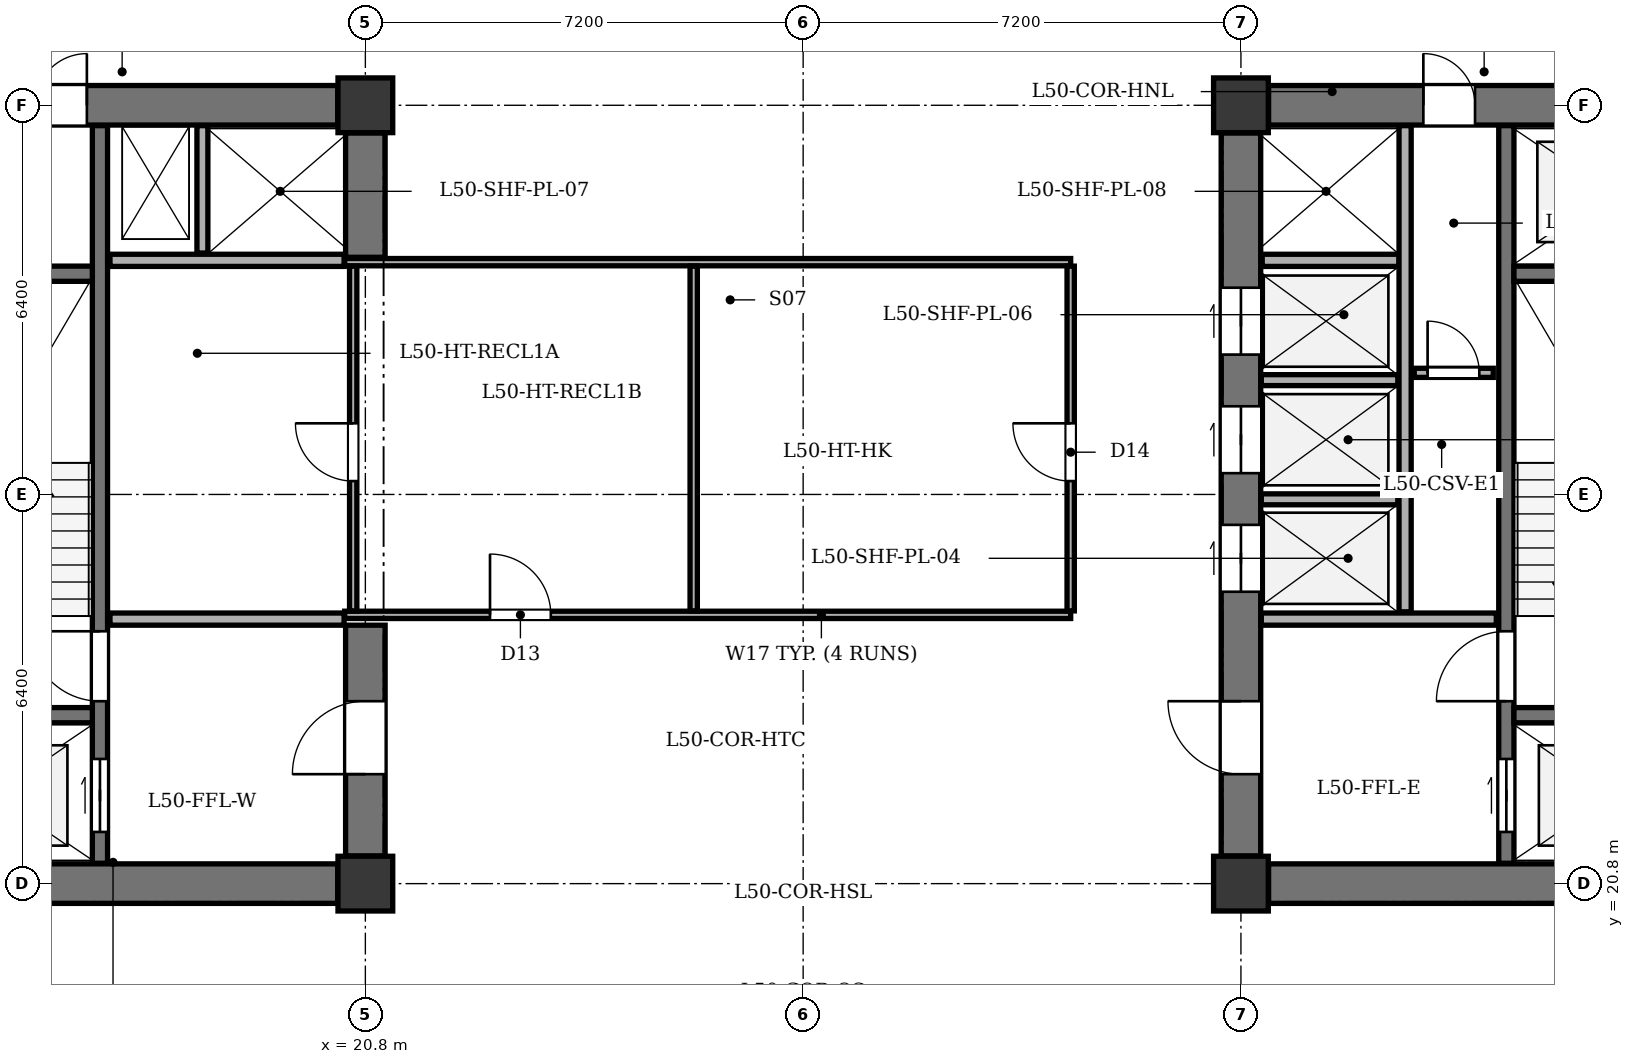
"""IFC4 building model, lengths in metres.
Left out: names, types, materials, properties, quantities, classifications, styles, units other than length and angle.
Written with IfcOpenShell. Run it as: python <this file> out.ifc"""

import sys

from ifc_helpers import new_model, si_unit, direction, frame, frame_2d, origin, origin_2d, place, context, subcontext, project, spatial, rectangle, extrude, element, fill, save


model = new_model("IFC4")
c1 = context("Model", 3, precision=1e-05, world=origin(), true_north=direction((0.0, 1.0)))
c2 = subcontext(c1, "Body", "Model", "MODEL_VIEW")
j1 = project(units=[si_unit("LENGTHUNIT", "METRE"), si_unit("PLANEANGLEUNIT", "RADIAN")], contexts=[c1])
p1 = place(None, origin())
s1 = spatial("IfcSite", under=j1, at=p1, CompositionType="ELEMENT")
p2 = place(p1, origin())
s2 = spatial("IfcBuilding", under=s1, at=p2, CompositionType="ELEMENT")
p3 = place(p2, frame((0.0, 0.0, 193.8)))
s3 = spatial("IfcBuildingStorey", under=s2, at=p3, CompositionType="ELEMENT", Elevation=193.8)
for number, where, z_axis, x_axis in (
    (1, (20.8, 20.8, 0.0), (0.0, 0.0, 1.0), (1.0, 0.0, 0.0)),
    (2, (20.8, 33.6, 0.0), (0.0, 0.0, 1.0), (1.0, 0.0, 0.0)),
    (3, (35.2, 20.8, 0.0), (0.0, 0.0, 1.0), (1.0, 0.0, 0.0)),
    (4, (35.2, 33.6, 0.0), (0.0, 0.0, 1.0), (1.0, 0.0, 0.0)),
):
    element("IfcColumn", number, at=place(p3, frame(where, z_axis=z_axis, x_axis=x_axis)), inside=s3, PredefinedType="COLUMN", context=c2, shape_type="SweptSolid", body=[
        extrude(rectangle(XDim=0.9, YDim=0.9, at=origin_2d()), origin(), (0.0, 0.0, 1.0), 3.5),
    ])
p4 = place(p3, frame((13.255, 20.8, 0.0), z_axis=(0.0, 0.0, 1.0), x_axis=(1.0, 0.0, 0.0)))
e5 = element("IfcWall", 5, at=p4, inside=s3, PredefinedType="SHEAR", context=c2, shape_type="SweptSolid", body=[
    extrude(rectangle(XDim=7.09, YDim=0.65, at=frame_2d((3.545, 0.0))), origin(), (0.0, 0.0, 1.0), 3.05),
])
p5 = place(p3, frame((13.255, 33.6, 0.0), z_axis=(0.0, 0.0, 1.0), x_axis=(1.0, 0.0, 0.0)))
e6 = element("IfcWall", 6, at=p5, inside=s3, PredefinedType="SHEAR", context=c2, shape_type="SweptSolid", body=[
    extrude(rectangle(XDim=7.09, YDim=0.65, at=frame_2d((3.545, 0.0))), origin(), (0.0, 0.0, 1.0), 3.05),
])
p6 = place(p5, frame((2.115, 0.0, 0.0)))
e7 = element("IfcOpeningElement", 7, at=p6, cuts=e6, PredefinedType="OPENING", context=c2, shape_type="SweptSolid", body=[
    extrude(rectangle(XDim=0.85, YDim=2.02, at=frame_2d((0.425, 1.01))), frame((0.0, 0.335, 0.0), z_axis=(0.0, -1.0, 0.0), x_axis=(1.0, 0.0, 0.0)), (0.0, 0.0, 1.0), 0.67),
])
p7 = place(p3, frame((20.8, 21.255, 0.0), z_axis=(0.0, 0.0, 1.0), x_axis=(0.0, 1.0, 0.0)))
e8 = element("IfcWall", 8, at=p7, inside=s3, PredefinedType="SHEAR", context=c2, shape_type="SweptSolid", body=[
    extrude(rectangle(XDim=3.795, YDim=0.65, at=frame_2d((1.897, 0.0))), origin(), (0.0, 0.0, 1.0), 3.05),
])
p8 = place(p7, frame((1.345, 0.0, 0.0)))
e9 = element("IfcOpeningElement", 9, at=p8, cuts=e8, PredefinedType="OPENING", context=c2, shape_type="SweptSolid", body=[
    extrude(rectangle(XDim=1.2, YDim=2.15, at=frame_2d((0.6, 1.075))), frame((0.0, 0.335, 0.0), z_axis=(0.0, -1.0, 0.0), x_axis=(1.0, 0.0, 0.0)), (0.0, 0.0, 1.0), 0.67),
])
p9 = place(p3, frame((20.8, 31.1, 0.0), z_axis=(0.0, 0.0, 1.0), x_axis=(0.0, 1.0, 0.0)))
e10 = element("IfcWall", 10, at=p9, inside=s3, PredefinedType="SHEAR", context=c2, shape_type="SweptSolid", body=[
    extrude(rectangle(XDim=2.045, YDim=0.65, at=frame_2d((1.022, 0.0))), origin(), (0.0, 0.0, 1.0), 3.05),
])
p10 = place(p3, frame((16.435, 21.135, 0.0), z_axis=(0.0, 0.0, 1.0), x_axis=(0.0, 1.0, 0.0)))
e11 = element("IfcWall", 11, at=p10, inside=s3, PredefinedType="SHEAR", context=c2, shape_type="SweptSolid", body=[
    extrude(rectangle(XDim=12.13, YDim=0.25, at=frame_2d((6.065, 0.0))), origin(), (0.0, 0.0, 1.0), 3.05),
])
p11 = place(p10, frame((0.515, 0.0, 0.0)))
e12 = element("IfcOpeningElement", 12, at=p11, cuts=e11, PredefinedType="OPENING", context=c2, shape_type="SweptSolid", body=[
    extrude(rectangle(XDim=1.2, YDim=2.15, at=frame_2d((0.6, 1.075))), frame((0.0, 0.135, 0.0), z_axis=(0.0, -1.0, 0.0), x_axis=(1.0, 0.0, 0.0)), (0.0, 0.0, 1.0), 0.27),
])
p12 = place(p10, frame((2.665, 0.0, 0.0)))
e13 = element("IfcOpeningElement", 13, at=p12, cuts=e11, PredefinedType="OPENING", context=c2, shape_type="SweptSolid", body=[
    extrude(rectangle(XDim=1.15, YDim=2.15, at=frame_2d((0.575, 1.075))), frame((0.0, 0.135, 0.0), z_axis=(0.0, -1.0, 0.0), x_axis=(1.0, 0.0, 0.0)), (0.0, 0.0, 1.0), 0.27),
])
for number, where, z_axis, x_axis in (
    (14, (13.135, 23.57, 0.0), (0.0, 0.0, 1.0), (1.0, 0.0, 0.0)),
    (15, (13.135, 30.83, 0.0), (0.0, 0.0, 1.0), (1.0, 0.0, 0.0)),
):
    element("IfcWall", number, at=place(p3, frame(where, z_axis=z_axis, x_axis=x_axis)), inside=s3, PredefinedType="SHEAR", context=c2, shape_type="SweptSolid", body=[
        extrude(rectangle(XDim=3.175, YDim=0.25, at=frame_2d((1.587, 0.0))), origin(), (0.0, 0.0, 1.0), 3.05),
    ])
for number, where, z_axis, x_axis in (
    (16, (16.6, 25.15, 0.0), (0.0, 0.0, 1.0), (1.0, 0.0, 0.0)),
    (17, (16.6, 31.05, 0.0), (0.0, 0.0, 1.0), (1.0, 0.0, 0.0)),
):
    element("IfcWall", number, at=place(p3, frame(where, z_axis=z_axis, x_axis=x_axis)), inside=s3, PredefinedType="SOLIDWALL", context=c2, shape_type="SweptSolid", body=[
        extrude(rectangle(XDim=3.85, YDim=0.2, at=frame_2d((1.925, 0.0))), origin(), (0.0, 0.0, 1.0), 3.05),
    ])
p13 = place(p3, frame((18.12, 31.17, 0.0), z_axis=(0.0, 0.0, 1.0), x_axis=(0.0, 1.0, 0.0)))
e18 = element("IfcWall", 18, at=p13, inside=s3, PredefinedType="PARTITIONING", context=c2, shape_type="SweptSolid", body=[
    extrude(rectangle(XDim=2.095, YDim=0.18, at=frame_2d((1.047, 0.0))), origin(), (0.0, 0.0, 1.0), 3.05),
])
p14 = place(p3, frame((35.655, 20.8, 0.0), z_axis=(0.0, 0.0, 1.0), x_axis=(1.0, 0.0, 0.0)))
e19 = element("IfcWall", 19, at=p14, inside=s3, PredefinedType="SHEAR", context=c2, shape_type="SweptSolid", body=[
    extrude(rectangle(XDim=7.09, YDim=0.65, at=frame_2d((3.545, 0.0))), origin(), (0.0, 0.0, 1.0), 3.05),
])
p15 = place(p3, frame((35.655, 33.6, 0.0), z_axis=(0.0, 0.0, 1.0), x_axis=(1.0, 0.0, 0.0)))
e20 = element("IfcWall", 20, at=p15, inside=s3, PredefinedType="SHEAR", context=c2, shape_type="SweptSolid", body=[
    extrude(rectangle(XDim=7.09, YDim=0.65, at=frame_2d((3.545, 0.0))), origin(), (0.0, 0.0, 1.0), 3.05),
])
p16 = place(p15, frame((4.745, 0.0, 0.0)))
e21 = element("IfcOpeningElement", 21, at=p16, cuts=e20, PredefinedType="OPENING", context=c2, shape_type="SweptSolid", body=[
    extrude(rectangle(XDim=1.3, YDim=2.15, at=frame_2d((0.65, 1.075))), frame((0.0, 0.335, 0.0), z_axis=(0.0, -1.0, 0.0), x_axis=(1.0, 0.0, 0.0)), (0.0, 0.0, 1.0), 0.67),
])
p17 = place(p15, frame((2.545, 0.0, 0.0)))
e22 = element("IfcOpeningElement", 22, at=p17, cuts=e20, PredefinedType="OPENING", context=c2, shape_type="SweptSolid", body=[
    extrude(rectangle(XDim=0.85, YDim=2.02, at=frame_2d((0.425, 1.01))), frame((0.0, 0.335, 0.0), z_axis=(0.0, -1.0, 0.0), x_axis=(1.0, 0.0, 0.0)), (0.0, 0.0, 1.0), 0.67),
])
p18 = place(p3, frame((35.2, 21.255, 0.0), z_axis=(0.0, 0.0, 1.0), x_axis=(0.0, 1.0, 0.0)))
e23 = element("IfcWall", 23, at=p18, inside=s3, PredefinedType="SHEAR", context=c2, shape_type="SweptSolid", body=[
    extrude(rectangle(XDim=11.89, YDim=0.65, at=frame_2d((5.945, 0.0))), origin(), (0.0, 0.0, 1.0), 3.05),
])
p19 = place(p18, frame((1.345, 0.0, 0.0)))
e24 = element("IfcOpeningElement", 24, at=p19, cuts=e23, PredefinedType="OPENING", context=c2, shape_type="SweptSolid", body=[
    extrude(rectangle(XDim=1.2, YDim=2.15, at=frame_2d((0.6, 1.075))), frame((0.0, 0.335, 0.0), z_axis=(0.0, -1.0, 0.0), x_axis=(1.0, 0.0, 0.0)), (0.0, 0.0, 1.0), 0.67),
])
p20 = place(p18, frame((4.345, 0.0, 0.0)))
e25 = element("IfcOpeningElement", 25, at=p20, cuts=e23, PredefinedType="OPENING", context=c2, shape_type="SweptSolid", body=[
    extrude(rectangle(XDim=1.1, YDim=2.1, at=frame_2d((0.55, 1.05))), frame((0.0, 0.335, 0.0), z_axis=(0.0, -1.0, 0.0), x_axis=(1.0, 0.0, 0.0)), (0.0, 0.0, 1.0), 0.67),
])
p21 = place(p18, frame((6.295, 0.0, 0.0)))
e26 = element("IfcOpeningElement", 26, at=p21, cuts=e23, PredefinedType="OPENING", context=c2, shape_type="SweptSolid", body=[
    extrude(rectangle(XDim=1.1, YDim=2.1, at=frame_2d((0.55, 1.05))), frame((0.0, 0.335, 0.0), z_axis=(0.0, -1.0, 0.0), x_axis=(1.0, 0.0, 0.0)), (0.0, 0.0, 1.0), 0.67),
])
p22 = place(p18, frame((8.245, 0.0, 0.0)))
e27 = element("IfcOpeningElement", 27, at=p22, cuts=e23, PredefinedType="OPENING", context=c2, shape_type="SweptSolid", body=[
    extrude(rectangle(XDim=1.1, YDim=2.1, at=frame_2d((0.55, 1.05))), frame((0.0, 0.335, 0.0), z_axis=(0.0, -1.0, 0.0), x_axis=(1.0, 0.0, 0.0)), (0.0, 0.0, 1.0), 0.67),
])
p23 = place(p3, frame((39.565, 21.135, 0.0), z_axis=(0.0, 0.0, 1.0), x_axis=(0.0, 1.0, 0.0)))
e28 = element("IfcWall", 28, at=p23, inside=s3, PredefinedType="SHEAR", context=c2, shape_type="SweptSolid", body=[
    extrude(rectangle(XDim=12.13, YDim=0.25, at=frame_2d((6.065, 0.0))), origin(), (0.0, 0.0, 1.0), 3.05),
])
p24 = place(p23, frame((0.515, 0.0, 0.0)))
e29 = element("IfcOpeningElement", 29, at=p24, cuts=e28, PredefinedType="OPENING", context=c2, shape_type="SweptSolid", body=[
    extrude(rectangle(XDim=1.2, YDim=2.15, at=frame_2d((0.6, 1.075))), frame((0.0, 0.135, 0.0), z_axis=(0.0, -1.0, 0.0), x_axis=(1.0, 0.0, 0.0)), (0.0, 0.0, 1.0), 0.27),
])
p25 = place(p23, frame((2.665, 0.0, 0.0)))
e30 = element("IfcOpeningElement", 30, at=p25, cuts=e28, PredefinedType="OPENING", context=c2, shape_type="SweptSolid", body=[
    extrude(rectangle(XDim=1.15, YDim=2.15, at=frame_2d((0.575, 1.075))), frame((0.0, 0.135, 0.0), z_axis=(0.0, -1.0, 0.0), x_axis=(1.0, 0.0, 0.0)), (0.0, 0.0, 1.0), 0.27),
])
for number, where, z_axis, x_axis in (
    (31, (39.69, 23.57, 0.0), (0.0, 0.0, 1.0), (1.0, 0.0, 0.0)),
    (32, (39.69, 30.83, 0.0), (0.0, 0.0, 1.0), (1.0, 0.0, 0.0)),
):
    element("IfcWall", number, at=place(p3, frame(where, z_axis=z_axis, x_axis=x_axis)), inside=s3, PredefinedType="SHEAR", context=c2, shape_type="SweptSolid", body=[
        extrude(rectangle(XDim=3.175, YDim=0.25, at=frame_2d((1.587, 0.0))), origin(), (0.0, 0.0, 1.0), 3.05),
    ])
p26 = place(p3, frame((35.535, 25.15, 0.0), z_axis=(0.0, 0.0, 1.0), x_axis=(1.0, 0.0, 0.0)))
e33 = element("IfcWall", 33, at=p26, inside=s3, PredefinedType="SOLIDWALL", context=c2, shape_type="SweptSolid", body=[
    extrude(rectangle(XDim=3.865, YDim=0.2, at=frame_2d((1.933, 0.0))), origin(), (0.0, 0.0, 1.0), 3.05),
])
p27 = place(p3, frame((35.55, 31.05, 0.0), z_axis=(0.0, 0.0, 1.0), x_axis=(1.0, 0.0, 0.0)))
e34 = element("IfcWall", 34, at=p27, inside=s3, PredefinedType="SOLIDWALL", context=c2, shape_type="SweptSolid", body=[
    extrude(rectangle(XDim=2.25, YDim=0.2, at=frame_2d((1.125, 0.0))), origin(), (0.0, 0.0, 1.0), 3.05),
])
p28 = place(p3, frame((37.9, 25.27, 0.0), z_axis=(0.0, 0.0, 1.0), x_axis=(0.0, 1.0, 0.0)))
e35 = element("IfcWall", 35, at=p28, inside=s3, PredefinedType="SOLIDWALL", context=c2, shape_type="SweptSolid", body=[
    extrude(rectangle(XDim=7.995, YDim=0.2, at=frame_2d((3.998, 0.0))), origin(), (0.0, 0.0, 1.0), 3.05),
])
for number, where, z_axis, x_axis in (
    (36, (35.535, 27.12, 0.0), (0.0, 0.0, 1.0), (1.0, 0.0, 0.0)),
    (37, (35.535, 29.08, 0.0), (0.0, 0.0, 1.0), (1.0, 0.0, 0.0)),
):
    element("IfcWall", number, at=place(p3, frame(where, z_axis=z_axis, x_axis=x_axis)), inside=s3, PredefinedType="PARTITIONING", context=c2, shape_type="SweptSolid", body=[
        extrude(rectangle(XDim=2.245, YDim=0.18, at=frame_2d((1.123, 0.0))), origin(), (0.0, 0.0, 1.0), 3.05),
    ])
p29 = place(p3, frame((38.05, 29.2, 0.0), z_axis=(0.0, 0.0, 1.0), x_axis=(1.0, 0.0, 0.0)))
e38 = element("IfcWall", 38, at=p29, inside=s3, PredefinedType="PARTITIONING", context=c2, shape_type="SweptSolid", body=[
    extrude(rectangle(XDim=1.3, YDim=0.15, at=frame_2d((0.65, 0.0))), origin(), (0.0, 0.0, 1.0), 3.05),
])
p30 = place(p29, frame((0.22, 0.0, 0.0)))
e39 = element("IfcOpeningElement", 39, at=p30, cuts=e38, PredefinedType="OPENING", context=c2, shape_type="SweptSolid", body=[
    extrude(rectangle(XDim=0.85, YDim=2.02, at=frame_2d((0.425, 1.01))), frame((0.0, 0.085, 0.0), z_axis=(0.0, -1.0, 0.0), x_axis=(1.0, 0.0, 0.0)), (0.0, 0.0, 1.0), 0.17),
])
p31 = place(p3, frame((20.46, 25.22, 0.0), z_axis=(0.0, 0.0, 1.0), x_axis=(1.0, 0.0, 0.0)))
e40 = element("IfcWall", 40, at=p31, inside=s3, PredefinedType="PARTITIONING", context=c2, shape_type="SweptSolid", body=[
    extrude(rectangle(XDim=11.94, YDim=0.12, at=frame_2d((5.97, 0.0))), origin(), (0.0, 0.0, 1.0), 3.05),
])
p32 = place(p31, frame((2.39, 0.0, 0.0)))
e41 = element("IfcOpeningElement", 41, at=p32, cuts=e40, PredefinedType="OPENING", context=c2, shape_type="SweptSolid", body=[
    extrude(rectangle(XDim=1.0, YDim=2.1, at=frame_2d((0.5, 1.05))), frame((0.0, 0.07, 0.0), z_axis=(0.0, -1.0, 0.0), x_axis=(1.0, 0.0, 0.0)), (0.0, 0.0, 1.0), 0.14),
])
p33 = place(p3, frame((20.46, 31.02, 0.0), z_axis=(0.0, 0.0, 1.0), x_axis=(1.0, 0.0, 0.0)))
e42 = element("IfcWall", 42, at=p33, inside=s3, PredefinedType="PARTITIONING", context=c2, shape_type="SweptSolid", body=[
    extrude(rectangle(XDim=11.94, YDim=0.12, at=frame_2d((5.97, 0.0))), origin(), (0.0, 0.0, 1.0), 3.05),
])
p34 = place(p3, frame((32.4, 25.285, 0.0), z_axis=(0.0, 0.0, 1.0), x_axis=(0.0, 1.0, 0.0)))
e43 = element("IfcWall", 43, at=p34, inside=s3, PredefinedType="PARTITIONING", context=c2, shape_type="SweptSolid", body=[
    extrude(rectangle(XDim=5.67, YDim=0.12, at=frame_2d((2.835, 0.0))), origin(), (0.0, 0.0, 1.0), 3.05),
])
p35 = place(p34, frame((2.135, 0.0, 0.0)))
e44 = element("IfcOpeningElement", 44, at=p35, cuts=e43, PredefinedType="OPENING", context=c2, shape_type="SweptSolid", body=[
    extrude(rectangle(XDim=0.95, YDim=2.1, at=frame_2d((0.475, 1.05))), frame((0.0, 0.07, 0.0), z_axis=(0.0, -1.0, 0.0), x_axis=(1.0, 0.0, 0.0)), (0.0, 0.0, 1.0), 0.14),
])
p36 = place(p3, frame((20.6, 25.285, 0.0), z_axis=(0.0, 0.0, 1.0), x_axis=(0.0, 1.0, 0.0)))
e45 = element("IfcWall", 45, at=p36, inside=s3, PredefinedType="PARTITIONING", context=c2, shape_type="SweptSolid", body=[
    extrude(rectangle(XDim=5.67, YDim=0.12, at=frame_2d((2.835, 0.0))), origin(), (0.0, 0.0, 1.0), 2.585),
])
p37 = place(p36, frame((2.135, 0.0, 0.0)))
e46 = element("IfcOpeningElement", 46, at=p37, cuts=e45, PredefinedType="OPENING", context=c2, shape_type="SweptSolid", body=[
    extrude(rectangle(XDim=0.95, YDim=2.1, at=frame_2d((0.475, 1.05))), frame((0.0, 0.07, 0.0), z_axis=(0.0, -1.0, 0.0), x_axis=(1.0, 0.0, 0.0)), (0.0, 0.0, 1.0), 0.14),
])
p38 = place(p3, frame((26.2, 25.285, 0.0), z_axis=(0.0, 0.0, 1.0), x_axis=(0.0, 1.0, 0.0)))
e47 = element("IfcWall", 47, at=p38, inside=s3, PredefinedType="PARTITIONING", context=c2, shape_type="SweptSolid", body=[
    extrude(rectangle(XDim=5.67, YDim=0.12, at=frame_2d((2.835, 0.0))), origin(), (0.0, 0.0, 1.0), 3.05),
])
p39 = place(p6, origin())
e48 = element("IfcDoor", 48, at=p39, inside=s3, OperationType="SINGLE_SWING_RIGHT", PredefinedType="DOOR", context=c2, shape_type="SweptSolid", body=[
    extrude(rectangle(XDim=0.85, YDim=2.02, at=frame_2d((0.425, 1.01))), frame((0.0, 0.025, 0.0), z_axis=(0.0, -1.0, 0.0), x_axis=(1.0, 0.0, 0.0)), (0.0, 0.0, 1.0), 0.05),
])
fill(e7, e48)
p40 = place(p8, origin())
e49 = element("IfcDoor", 49, at=p40, inside=s3, OperationType="SINGLE_SWING_LEFT", PredefinedType="DOOR", context=c2, shape_type="SweptSolid", body=[
    extrude(rectangle(XDim=1.2, YDim=2.15, at=frame_2d((0.6, 1.075))), frame((0.0, 0.025, 0.0), z_axis=(0.0, -1.0, 0.0), x_axis=(1.0, 0.0, 0.0)), (0.0, 0.0, 1.0), 0.05),
])
fill(e9, e49)
p41 = place(p11, origin())
e50 = element("IfcDoor", 50, at=p41, inside=s3, OperationType="DOUBLE_DOOR_SLIDING", PredefinedType="DOOR", context=c2, shape_type="SweptSolid", body=[
    extrude(rectangle(XDim=1.2, YDim=2.15, at=frame_2d((0.6, 1.075))), frame((0.0, 0.025, 0.0), z_axis=(0.0, -1.0, 0.0), x_axis=(1.0, 0.0, 0.0)), (0.0, 0.0, 1.0), 0.05),
])
fill(e12, e50)
p42 = place(p12, origin())
e51 = element("IfcDoor", 51, at=p42, inside=s3, OperationType="SINGLE_SWING_RIGHT", PredefinedType="DOOR", context=c2, shape_type="SweptSolid", body=[
    extrude(rectangle(XDim=1.15, YDim=2.15, at=frame_2d((0.575, 1.075))), frame((0.0, 0.025, 0.0), z_axis=(0.0, -1.0, 0.0), x_axis=(1.0, 0.0, 0.0)), (0.0, 0.0, 1.0), 0.05),
])
fill(e13, e51)
p43 = place(p17, origin())
e52 = element("IfcDoor", 52, at=p43, inside=s3, OperationType="SINGLE_SWING_LEFT", PredefinedType="DOOR", context=c2, shape_type="SweptSolid", body=[
    extrude(rectangle(XDim=0.85, YDim=2.02, at=frame_2d((0.425, 1.01))), frame((0.0, 0.025, 0.0), z_axis=(0.0, -1.0, 0.0), x_axis=(1.0, 0.0, 0.0)), (0.0, 0.0, 1.0), 0.05),
])
fill(e22, e52)
p44 = place(p19, origin())
e53 = element("IfcDoor", 53, at=p44, inside=s3, OperationType="SINGLE_SWING_RIGHT", PredefinedType="DOOR", context=c2, shape_type="SweptSolid", body=[
    extrude(rectangle(XDim=1.2, YDim=2.15, at=frame_2d((0.6, 1.075))), frame((0.0, 0.025, 0.0), z_axis=(0.0, -1.0, 0.0), x_axis=(1.0, 0.0, 0.0)), (0.0, 0.0, 1.0), 0.05),
])
fill(e24, e53)
p45 = place(p20, origin())
e54 = element("IfcDoor", 54, at=p45, inside=s3, OperationType="DOUBLE_DOOR_SLIDING", PredefinedType="DOOR", context=c2, shape_type="SweptSolid", body=[
    extrude(rectangle(XDim=1.1, YDim=2.1, at=frame_2d((0.55, 1.05))), frame((0.0, 0.025, 0.0), z_axis=(0.0, -1.0, 0.0), x_axis=(1.0, 0.0, 0.0)), (0.0, 0.0, 1.0), 0.05),
])
fill(e25, e54)
p46 = place(p21, origin())
e55 = element("IfcDoor", 55, at=p46, inside=s3, OperationType="DOUBLE_DOOR_SLIDING", PredefinedType="DOOR", context=c2, shape_type="SweptSolid", body=[
    extrude(rectangle(XDim=1.1, YDim=2.1, at=frame_2d((0.55, 1.05))), frame((0.0, 0.025, 0.0), z_axis=(0.0, -1.0, 0.0), x_axis=(1.0, 0.0, 0.0)), (0.0, 0.0, 1.0), 0.05),
])
fill(e26, e55)
p47 = place(p22, origin())
e56 = element("IfcDoor", 56, at=p47, inside=s3, OperationType="DOUBLE_DOOR_SLIDING", PredefinedType="DOOR", context=c2, shape_type="SweptSolid", body=[
    extrude(rectangle(XDim=1.1, YDim=2.1, at=frame_2d((0.55, 1.05))), frame((0.0, 0.025, 0.0), z_axis=(0.0, -1.0, 0.0), x_axis=(1.0, 0.0, 0.0)), (0.0, 0.0, 1.0), 0.05),
])
fill(e27, e56)
p48 = place(p24, origin())
e57 = element("IfcDoor", 57, at=p48, inside=s3, OperationType="DOUBLE_DOOR_SLIDING", PredefinedType="DOOR", context=c2, shape_type="SweptSolid", body=[
    extrude(rectangle(XDim=1.2, YDim=2.15, at=frame_2d((0.6, 1.075))), frame((0.0, 0.025, 0.0), z_axis=(0.0, -1.0, 0.0), x_axis=(1.0, 0.0, 0.0)), (0.0, 0.0, 1.0), 0.05),
])
fill(e29, e57)
p49 = place(p25, origin())
e58 = element("IfcDoor", 58, at=p49, inside=s3, OperationType="SINGLE_SWING_LEFT", PredefinedType="DOOR", context=c2, shape_type="SweptSolid", body=[
    extrude(rectangle(XDim=1.15, YDim=2.15, at=frame_2d((0.575, 1.075))), frame((0.0, 0.025, 0.0), z_axis=(0.0, -1.0, 0.0), x_axis=(1.0, 0.0, 0.0)), (0.0, 0.0, 1.0), 0.05),
])
fill(e30, e58)
p50 = place(p30, origin())
e59 = element("IfcDoor", 59, at=p50, inside=s3, OperationType="SINGLE_SWING_LEFT", PredefinedType="DOOR", context=c2, shape_type="SweptSolid", body=[
    extrude(rectangle(XDim=0.85, YDim=2.02, at=frame_2d((0.425, 1.01))), frame((0.0, 0.025, 0.0), z_axis=(0.0, -1.0, 0.0), x_axis=(1.0, 0.0, 0.0)), (0.0, 0.0, 1.0), 0.05),
])
fill(e39, e59)
p51 = place(p37, origin())
e60 = element("IfcDoor", 60, at=p51, inside=s3, OperationType="SINGLE_SWING_RIGHT", PredefinedType="DOOR", context=c2, shape_type="SweptSolid", body=[
    extrude(rectangle(XDim=0.95, YDim=2.1, at=frame_2d((0.475, 1.05))), frame((0.0, 0.025, 0.0), z_axis=(0.0, -1.0, 0.0), x_axis=(1.0, 0.0, 0.0)), (0.0, 0.0, 1.0), 0.05),
])
fill(e46, e60)
p52 = place(p32, origin())
e61 = element("IfcDoor", 61, at=p52, inside=s3, OperationType="SINGLE_SWING_LEFT", PredefinedType="DOOR", context=c2, shape_type="SweptSolid", body=[
    extrude(rectangle(XDim=1.0, YDim=2.1, at=frame_2d((0.5, 1.05))), frame((0.0, 0.025, 0.0), z_axis=(0.0, -1.0, 0.0), x_axis=(1.0, 0.0, 0.0)), (0.0, 0.0, 1.0), 0.05),
])
fill(e41, e61)
p53 = place(p35, origin())
e62 = element("IfcDoor", 62, at=p53, inside=s3, OperationType="SINGLE_SWING_RIGHT", PredefinedType="DOOR", context=c2, shape_type="SweptSolid", body=[
    extrude(rectangle(XDim=0.95, YDim=2.1, at=frame_2d((0.475, 1.05))), frame((0.0, 0.025, 0.0), z_axis=(0.0, -1.0, 0.0), x_axis=(1.0, 0.0, 0.0)), (0.0, 0.0, 1.0), 0.05),
])
fill(e44, e62)
save(model, sys.argv[1])
